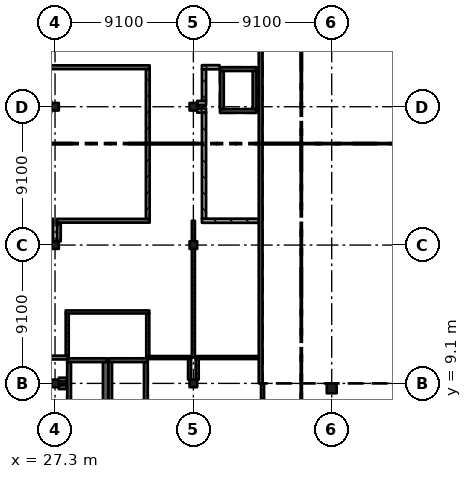
"""IFC4 building model, lengths in metres.
Left out: names, types, materials, properties, quantities, classifications, styles, units other than length and angle.
Written with IfcOpenShell. Run it as: python <this file> out.ifc"""

import sys

from ifc_helpers import new_model, si_unit, direction, frame, frame_2d, origin, origin_2d, place, context, subcontext, project, spatial, rectangle, extrude, element, fill, save


model = new_model("IFC4")
c1 = context("Model", 3, precision=1e-05, world=origin(), true_north=direction((0.0, 1.0)))
c2 = subcontext(c1, "Body", "Model", "MODEL_VIEW")
j1 = project(units=[si_unit("LENGTHUNIT", "METRE"), si_unit("PLANEANGLEUNIT", "RADIAN")], contexts=[c1])
p1 = place(None, origin())
s1 = spatial("IfcSite", under=j1, at=p1, CompositionType="ELEMENT")
p2 = place(p1, origin())
s2 = spatial("IfcBuilding", under=s1, at=p2, CompositionType="ELEMENT")
p3 = place(p2, frame((0.0, 0.0, 24.57)))
s3 = spatial("IfcBuildingStorey", under=s2, at=p3, CompositionType="ELEMENT", Elevation=24.57)
for number, where, z_axis, x_axis in (
    (1, (27.3, 9.1, 0.0), (0.0, 0.0, 1.0), (1.0, 0.0, 0.0)),
    (2, (27.3, 18.2, 0.0), (0.0, 0.0, 1.0), (1.0, 0.0, 0.0)),
    (3, (27.3, 27.3, 0.0), (0.0, 0.0, 1.0), (1.0, 0.0, 0.0)),
    (4, (36.4, 9.1, 0.0), (0.0, 0.0, 1.0), (1.0, 0.0, 0.0)),
    (5, (36.4, 18.2, 0.0), (0.0, 0.0, 1.0), (1.0, 0.0, 0.0)),
    (6, (36.4, 27.3, 0.0), (0.0, 0.0, 1.0), (1.0, 0.0, 0.0)),
):
    element("IfcColumn", number, at=place(p3, frame(where, z_axis=z_axis, x_axis=x_axis)), inside=s3, PredefinedType="COLUMN", context=c2, shape_type="SweptSolid", body=[
        extrude(rectangle(XDim=0.5, YDim=0.5, at=origin_2d()), origin(), (0.0, 0.0, 1.0), 4.55),
    ])
p4 = place(p3, frame((45.5, 8.775, 0.0), z_axis=(0.0, 0.0, 1.0), x_axis=(1.0, 0.0, 0.0)))
e7 = element("IfcColumn", 7, at=p4, inside=s3, PredefinedType="COLUMN", context=c2, shape_type="SweptSolid", body=[
    extrude(rectangle(XDim=0.65, YDim=0.65, at=origin_2d()), origin(), (0.0, 0.0, 1.0), 4.55),
])
p5 = place(p3, frame((40.825, 40.95, 0.0), z_axis=(0.0, 0.0, 1.0), x_axis=(0.0, -1.0, 0.0)))
e8 = element("IfcWall", 8, at=p5, inside=s3, PredefinedType="SHEAR", context=c2, shape_type="SweptSolid", body=[
    extrude(rectangle(XDim=31.85, YDim=0.25, at=frame_2d((15.925, 0.0))), origin(), (0.0, 0.0, 1.0), 4.55),
])
p6 = place(p3, frame((30.7, 10.625, 0.0), z_axis=(0.0, 0.0, 1.0), x_axis=(-1.0, 0.0, 0.0)))
e9 = element("IfcWall", 9, at=p6, inside=s3, PredefinedType="SHEAR", context=c2, shape_type="SweptSolid", body=[
    extrude(rectangle(XDim=2.6, YDim=0.25, at=frame_2d((1.3, 0.0))), origin(), (0.0, 0.0, 1.0), 4.55),
])
p7 = place(p6, frame((0.8, 0.0, 0.0)))
e10 = element("IfcOpeningElement", 10, at=p7, cuts=e9, PredefinedType="OPENING", context=c2, shape_type="SweptSolid", body=[
    extrude(rectangle(XDim=1.0, YDim=2.1, at=frame_2d((0.5, 1.05))), frame((0.0, 0.135, 0.0), z_axis=(0.0, -1.0, 0.0), x_axis=(1.0, 0.0, 0.0)), (0.0, 0.0, 1.0), 0.27),
])
p8 = place(p3, frame((28.225, 10.5, 0.0), z_axis=(0.0, 0.0, 1.0), x_axis=(0.0, -1.0, 0.0)))
e11 = element("IfcWall", 11, at=p8, inside=s3, PredefinedType="SHEAR", context=c2, shape_type="SweptSolid", body=[
    extrude(rectangle(XDim=2.9, YDim=0.25, at=frame_2d((1.45, 0.0))), origin(), (0.0, 0.0, 1.0), 4.55),
])
p9 = place(p3, frame((30.625, 10.5, 0.0), z_axis=(0.0, 0.0, 1.0), x_axis=(0.0, -1.0, 0.0)))
e12 = element("IfcWall", 12, at=p9, inside=s3, PredefinedType="SHEAR", context=c2, shape_type="SweptSolid", body=[
    extrude(rectangle(XDim=2.9, YDim=0.35, at=frame_2d((1.45, 0.0))), origin(), (0.0, 0.0, 1.0), 4.55),
])
p10 = place(p3, frame((33.4, 10.625, 0.0), z_axis=(0.0, 0.0, 1.0), x_axis=(-1.0, 0.0, 0.0)))
e13 = element("IfcWall", 13, at=p10, inside=s3, PredefinedType="SHEAR", context=c2, shape_type="SweptSolid", body=[
    extrude(rectangle(XDim=2.6, YDim=0.25, at=frame_2d((1.3, 0.0))), origin(), (0.0, 0.0, 1.0), 4.55),
])
p11 = place(p10, frame((0.8, 0.0, 0.0)))
e14 = element("IfcOpeningElement", 14, at=p11, cuts=e13, PredefinedType="OPENING", context=c2, shape_type="SweptSolid", body=[
    extrude(rectangle(XDim=1.0, YDim=2.1, at=frame_2d((0.5, 1.05))), frame((0.0, 0.135, 0.0), z_axis=(0.0, -1.0, 0.0), x_axis=(1.0, 0.0, 0.0)), (0.0, 0.0, 1.0), 0.27),
])
for number, where, z_axis, x_axis in (
    (15, (30.925, 10.5, 0.0), (0.0, 0.0, 1.0), (0.0, -1.0, 0.0)),
    (16, (33.275, 10.5, 0.0), (0.0, 0.0, 1.0), (0.0, -1.0, 0.0)),
):
    element("IfcWall", number, at=place(p3, frame(where, z_axis=z_axis, x_axis=x_axis)), inside=s3, PredefinedType="SHEAR", context=c2, shape_type="SweptSolid", body=[
        extrude(rectangle(XDim=2.9, YDim=0.25, at=frame_2d((1.45, 0.0))), origin(), (0.0, 0.0, 1.0), 4.55),
    ])
p12 = place(p3, frame((40.55, 27.025, 0.0), z_axis=(0.0, 0.0, 1.0), x_axis=(-1.0, 0.0, 0.0)))
e17 = element("IfcWall", 17, at=p12, inside=s3, PredefinedType="SHEAR", context=c2, shape_type="SweptSolid", body=[
    extrude(rectangle(XDim=2.4, YDim=0.25, at=frame_2d((1.2, 0.0))), origin(), (0.0, 0.0, 1.0), 4.55),
])
p13 = place(p12, frame((0.75, 0.0, 0.0)))
e18 = element("IfcOpeningElement", 18, at=p13, cuts=e17, PredefinedType="OPENING", context=c2, shape_type="SweptSolid", body=[
    extrude(rectangle(XDim=0.9, YDim=2.1, at=frame_2d((0.45, 1.05))), frame((0.0, 0.135, 0.0), z_axis=(0.0, -1.0, 0.0), x_axis=(1.0, 0.0, 0.0)), (0.0, 0.0, 1.0), 0.27),
])
p14 = place(p3, frame((40.55, 29.775, 0.0), z_axis=(0.0, 0.0, 1.0), x_axis=(-1.0, 0.0, 0.0)))
e19 = element("IfcWall", 19, at=p14, inside=s3, PredefinedType="SHEAR", context=c2, shape_type="SweptSolid", body=[
    extrude(rectangle(XDim=2.4, YDim=0.25, at=frame_2d((1.2, 0.0))), origin(), (0.0, 0.0, 1.0), 4.55),
])
for number, where, z_axis, x_axis in (
    (20, (38.275, 29.65, 0.0), (0.0, 0.0, 1.0), (0.0, -1.0, 0.0)),
    (21, (40.425, 29.65, 0.0), (0.0, 0.0, 1.0), (0.0, -1.0, 0.0)),
):
    element("IfcWall", number, at=place(p3, frame(where, z_axis=z_axis, x_axis=x_axis)), inside=s3, PredefinedType="SHEAR", context=c2, shape_type="SweptSolid", body=[
        extrude(rectangle(XDim=2.5, YDim=0.25, at=frame_2d((1.25, 0.0))), origin(), (0.0, 0.0, 1.0), 4.55),
    ])
p15 = place(p3, frame((24.3, 19.8, 0.0), z_axis=(0.0, 0.0, 1.0), x_axis=(1.0, 0.0, 0.0)))
e22 = element("IfcWall", 22, at=p15, inside=s3, PredefinedType="SOLIDWALL", context=c2, shape_type="SweptSolid", body=[
    extrude(rectangle(XDim=2.875, YDim=0.25, at=frame_2d((1.438, 0.0))), origin(), (0.0, 0.0, 1.0), 4.35),
])
p16 = place(p3, frame((26.73, 29.9, 0.0), z_axis=(0.0, 0.0, 1.0), x_axis=(1.0, 0.0, 0.0)))
e23 = element("IfcWall", 23, at=p16, inside=s3, PredefinedType="SOLIDWALL", context=c2, shape_type="SweptSolid", body=[
    extrude(rectangle(XDim=6.795, YDim=0.25, at=frame_2d((3.397, 0.0))), origin(), (0.0, 0.0, 1.0), 4.35),
])
p17 = place(p3, frame((27.05, 19.675, 0.0), z_axis=(0.0, 0.0, 1.0), x_axis=(0.0, -1.0, 0.0)))
e24 = element("IfcWall", 24, at=p17, inside=s3, PredefinedType="SOLIDWALL", context=c2, shape_type="SweptSolid", body=[
    extrude(rectangle(XDim=1.225, YDim=0.25, at=frame_2d((0.613, 0.0))), origin(), (0.0, 0.0, 1.0), 4.35),
])
p18 = place(p3, frame((27.425, 19.8, 0.0), z_axis=(0.0, 0.0, 1.0), x_axis=(1.0, 0.0, 0.0)))
e25 = element("IfcWall", 25, at=p18, inside=s3, PredefinedType="SOLIDWALL", context=c2, shape_type="SweptSolid", body=[
    extrude(rectangle(XDim=6.1, YDim=0.25, at=frame_2d((3.05, 0.0))), origin(), (0.0, 0.0, 1.0), 4.35),
])
p19 = place(p18, frame((2.65, 0.0, 0.0)))
e26 = element("IfcOpeningElement", 26, at=p19, cuts=e25, PredefinedType="OPENING", context=c2, shape_type="SweptSolid", body=[
    extrude(rectangle(XDim=0.8, YDim=2.1, at=frame_2d((0.4, 1.05))), frame((0.0, 0.135, 0.0), z_axis=(0.0, -1.0, 0.0), x_axis=(1.0, 0.0, 0.0)), (0.0, 0.0, 1.0), 0.27),
])
p20 = place(p3, frame((27.55, 8.85, 0.0), z_axis=(0.0, 0.0, 1.0), x_axis=(1.0, 0.0, 0.0)))
e27 = element("IfcWall", 27, at=p20, inside=s3, PredefinedType="SOLIDWALL", context=c2, shape_type="SweptSolid", body=[
    extrude(rectangle(XDim=0.52, YDim=0.25, at=frame_2d((0.26, 0.0))), origin(), (0.0, 0.0, 1.0), 4.35),
])
p21 = place(p3, frame((27.55, 18.45, 0.0), z_axis=(0.0, 0.0, 1.0), x_axis=(0.0, 1.0, 0.0)))
e28 = element("IfcWall", 28, at=p21, inside=s3, PredefinedType="SOLIDWALL", context=c2, shape_type="SweptSolid", body=[
    extrude(rectangle(XDim=1.225, YDim=0.25, at=frame_2d((0.613, 0.0))), origin(), (0.0, 0.0, 1.0), 4.35),
])
p22 = place(p3, frame((28.07, 9.35, 0.0), z_axis=(0.0, 0.0, 1.0), x_axis=(-1.0, 0.0, 0.0)))
e29 = element("IfcWall", 29, at=p22, inside=s3, PredefinedType="SOLIDWALL", context=c2, shape_type="SweptSolid", body=[
    extrude(rectangle(XDim=0.52, YDim=0.25, at=frame_2d((0.26, 0.0))), origin(), (0.0, 0.0, 1.0), 4.35),
])
p23 = place(p3, frame((28.1, 13.7, 0.0), z_axis=(0.0, 0.0, 1.0), x_axis=(0.0, -1.0, 0.0)))
e30 = element("IfcWall", 30, at=p23, inside=s3, PredefinedType="PARTITIONING", context=c2, shape_type="SweptSolid", body=[
    extrude(rectangle(XDim=2.775, YDim=0.2, at=frame_2d((1.387, 0.0))), origin(), (0.0, 0.0, 1.0), 4.35),
])
p24 = place(p23, frame((0.45, 0.0, 0.0)))
e31 = element("IfcOpeningElement", 31, at=p24, cuts=e30, PredefinedType="OPENING", context=c2, shape_type="SweptSolid", body=[
    extrude(rectangle(XDim=1.8, YDim=2.4, at=frame_2d((0.9, 1.2))), frame((0.0, 0.11, 0.0), z_axis=(0.0, -1.0, 0.0), x_axis=(1.0, 0.0, 0.0)), (0.0, 0.0, 1.0), 0.22),
])
p25 = place(p3, frame((28.2, 10.8, 0.0), z_axis=(0.0, 0.0, 1.0), x_axis=(-1.0, 0.0, 0.0)))
e32 = element("IfcWall", 32, at=p25, inside=s3, PredefinedType="SOLIDWALL", context=c2, shape_type="SweptSolid", body=[
    extrude(rectangle(XDim=3.87, YDim=0.25, at=frame_2d((1.935, 0.0))), origin(), (0.0, 0.0, 1.0), 4.35),
])
p26 = place(p25, frame((1.45, 0.0, 0.0)))
e33 = element("IfcOpeningElement", 33, at=p26, cuts=e32, PredefinedType="OPENING", context=c2, shape_type="SweptSolid", body=[
    extrude(rectangle(XDim=1.0, YDim=2.1, at=frame_2d((0.5, 1.05))), frame((0.0, 0.135, 0.0), z_axis=(0.0, -1.0, 0.0), x_axis=(1.0, 0.0, 0.0)), (0.0, 0.0, 1.0), 0.27),
])
p27 = place(p3, frame((33.4, 10.9, 0.0), z_axis=(0.0, 0.0, 1.0), x_axis=(0.0, 1.0, 0.0)))
e34 = element("IfcWall", 34, at=p27, inside=s3, PredefinedType="PARTITIONING", context=c2, shape_type="SweptSolid", body=[
    extrude(rectangle(XDim=2.8, YDim=0.2, at=frame_2d((1.4, 0.0))), origin(), (0.0, 0.0, 1.0), 4.35),
])
p28 = place(p27, frame((0.55, 0.0, 0.0)))
e35 = element("IfcOpeningElement", 35, at=p28, cuts=e34, PredefinedType="OPENING", context=c2, shape_type="SweptSolid", body=[
    extrude(rectangle(XDim=1.8, YDim=2.4, at=frame_2d((0.9, 1.2))), frame((0.0, 0.11, 0.0), z_axis=(0.0, -1.0, 0.0), x_axis=(1.0, 0.0, 0.0)), (0.0, 0.0, 1.0), 0.22),
])
p29 = place(p3, frame((33.4, 29.775, 0.0), z_axis=(0.0, 0.0, 1.0), x_axis=(0.0, -1.0, 0.0)))
e36 = element("IfcWall", 36, at=p29, inside=s3, PredefinedType="SOLIDWALL", context=c2, shape_type="SweptSolid", body=[
    extrude(rectangle(XDim=9.85, YDim=0.25, at=frame_2d((4.925, 0.0))), origin(), (0.0, 0.0, 1.0), 4.35),
])
p30 = place(p3, frame((33.5, 13.8, 0.0), z_axis=(0.0, 0.0, 1.0), x_axis=(-1.0, 0.0, 0.0)))
e37 = element("IfcWall", 37, at=p30, inside=s3, PredefinedType="PARTITIONING", context=c2, shape_type="SweptSolid", body=[
    extrude(rectangle(XDim=5.5, YDim=0.2, at=frame_2d((2.75, 0.0))), origin(), (0.0, 0.0, 1.0), 4.35),
])
p31 = place(p30, frame((1.85, 0.0, 0.0)))
e38 = element("IfcOpeningElement", 38, at=p31, cuts=e37, PredefinedType="OPENING", context=c2, shape_type="SweptSolid", body=[
    extrude(rectangle(XDim=1.8, YDim=2.4, at=frame_2d((0.9, 1.2))), frame((0.0, 0.11, 0.0), z_axis=(0.0, -1.0, 0.0), x_axis=(1.0, 0.0, 0.0)), (0.0, 0.0, 1.0), 0.22),
])
p32 = place(p3, frame((36.15, 9.35, 0.0), z_axis=(0.0, 0.0, 1.0), x_axis=(0.0, 1.0, 0.0)))
e39 = element("IfcWall", 39, at=p32, inside=s3, PredefinedType="PARTITIONING", context=c2, shape_type="SweptSolid", body=[
    extrude(rectangle(XDim=1.35, YDim=0.2, at=frame_2d((0.675, 0.0))), origin(), (0.0, 0.0, 1.0), 3.6),
])
p33 = place(p3, frame((36.25, 10.8, 0.0), z_axis=(0.0, 0.0, 1.0), x_axis=(-1.0, 0.0, 0.0)))
e40 = element("IfcWall", 40, at=p33, inside=s3, PredefinedType="PARTITIONING", context=c2, shape_type="SweptSolid", body=[
    extrude(rectangle(XDim=2.95, YDim=0.2, at=frame_2d((1.475, 0.0))), origin(), (0.0, 0.0, 1.0), 4.35),
])
p34 = place(p33, frame((0.55, 0.0, 0.0)))
e41 = element("IfcOpeningElement", 41, at=p34, cuts=e40, PredefinedType="OPENING", context=c2, shape_type="SweptSolid", body=[
    extrude(rectangle(XDim=1.8, YDim=2.4, at=frame_2d((0.9, 1.2))), frame((0.0, 0.11, 0.0), z_axis=(0.0, -1.0, 0.0), x_axis=(1.0, 0.0, 0.0)), (0.0, 0.0, 1.0), 0.22),
])
p35 = place(p3, frame((36.4, 17.95, 0.0), z_axis=(0.0, 0.0, 1.0), x_axis=(0.0, -1.0, 0.0)))
e42 = element("IfcWall", 42, at=p35, inside=s3, PredefinedType="PARTITIONING", context=c2, shape_type="SweptSolid", body=[
    extrude(rectangle(XDim=7.15, YDim=0.2, at=frame_2d((3.575, 0.0))), origin(), (0.0, 0.0, 1.0), 3.6),
])
p36 = place(p35, frame((0.85, 0.0, 0.0)))
e43 = element("IfcOpeningElement", 43, at=p36, cuts=e42, PredefinedType="OPENING", context=c2, shape_type="SweptSolid", body=[
    extrude(rectangle(XDim=1.8, YDim=2.4, at=frame_2d((0.9, 1.2))), frame((0.0, 0.11, 0.0), z_axis=(0.0, -1.0, 0.0), x_axis=(1.0, 0.0, 0.0)), (0.0, 0.0, 1.0), 0.22),
])
p37 = place(p35, frame((4.45, 0.0, 0.0)))
e44 = element("IfcOpeningElement", 44, at=p37, cuts=e42, PredefinedType="OPENING", context=c2, shape_type="SweptSolid", body=[
    extrude(rectangle(XDim=1.8, YDim=2.4, at=frame_2d((0.9, 1.2))), frame((0.0, 0.11, 0.0), z_axis=(0.0, -1.0, 0.0), x_axis=(1.0, 0.0, 0.0)), (0.0, 0.0, 1.0), 0.22),
])
p38 = place(p3, frame((36.4, 19.8, 0.0), z_axis=(0.0, 0.0, 1.0), x_axis=(0.0, -1.0, 0.0)))
e45 = element("IfcWall", 45, at=p38, inside=s3, PredefinedType="PARTITIONING", context=c2, shape_type="SweptSolid", body=[
    extrude(rectangle(XDim=1.35, YDim=0.2, at=frame_2d((0.675, 0.0))), origin(), (0.0, 0.0, 1.0), 3.6),
])
p39 = place(p3, frame((36.65, 10.7, 0.0), z_axis=(0.0, 0.0, 1.0), x_axis=(0.0, -1.0, 0.0)))
e46 = element("IfcWall", 46, at=p39, inside=s3, PredefinedType="PARTITIONING", context=c2, shape_type="SweptSolid", body=[
    extrude(rectangle(XDim=1.35, YDim=0.2, at=frame_2d((0.675, 0.0))), origin(), (0.0, 0.0, 1.0), 3.6),
])
p40 = place(p3, frame((36.65, 27.05, 0.0), z_axis=(0.0, 0.0, 1.0), x_axis=(1.0, 0.0, 0.0)))
e47 = element("IfcWall", 47, at=p40, inside=s3, PredefinedType="SOLIDWALL", context=c2, shape_type="SweptSolid", body=[
    extrude(rectangle(XDim=0.588, YDim=0.275, at=frame_2d((0.294, 0.0))), origin(), (0.0, 0.0, 1.0), 4.35),
])
p41 = place(p3, frame((36.962, 19.8, 0.0), z_axis=(0.0, 0.0, 1.0), x_axis=(1.0, 0.0, 0.0)))
e48 = element("IfcWall", 48, at=p41, inside=s3, PredefinedType="SOLIDWALL", context=c2, shape_type="SweptSolid", body=[
    extrude(rectangle(XDim=3.738, YDim=0.275, at=frame_2d((1.869, 0.0))), origin(), (0.0, 0.0, 1.0), 4.35),
])
p42 = place(p41, frame((1.25, 0.0, 0.0)))
e49 = element("IfcOpeningElement", 49, at=p42, cuts=e48, PredefinedType="OPENING", context=c2, shape_type="SweptSolid", body=[
    extrude(rectangle(XDim=1.2, YDim=2.4, at=frame_2d((0.6, 1.2))), frame((0.0, 0.147, 0.0), z_axis=(0.0, -1.0, 0.0), x_axis=(1.0, 0.0, 0.0)), (0.0, 0.0, 1.0), 0.295),
])
p43 = place(p3, frame((36.962, 29.9, 0.0), z_axis=(0.0, 0.0, 1.0), x_axis=(1.0, 0.0, 0.0)))
e50 = element("IfcWall", 50, at=p43, inside=s3, PredefinedType="SOLIDWALL", context=c2, shape_type="SweptSolid", body=[
    extrude(rectangle(XDim=1.158, YDim=0.275, at=frame_2d((0.579, 0.0))), origin(), (0.0, 0.0, 1.0), 4.35),
])
p44 = place(p3, frame((37.1, 26.913, 0.0), z_axis=(0.0, 0.0, 1.0), x_axis=(0.0, -1.0, 0.0)))
e51 = element("IfcWall", 51, at=p44, inside=s3, PredefinedType="SOLIDWALL", context=c2, shape_type="SweptSolid", body=[
    extrude(rectangle(XDim=6.975, YDim=0.275, at=frame_2d((3.488, 0.0))), origin(), (0.0, 0.0, 1.0), 4.35),
])
p45 = place(p3, frame((37.1, 29.762, 0.0), z_axis=(0.0, 0.0, 1.0), x_axis=(0.0, -1.0, 0.0)))
e52 = element("IfcWall", 52, at=p45, inside=s3, PredefinedType="SOLIDWALL", context=c2, shape_type="SweptSolid", body=[
    extrude(rectangle(XDim=2.075, YDim=0.275, at=frame_2d((1.038, 0.0))), origin(), (0.0, 0.0, 1.0), 4.35),
])
p46 = place(p3, frame((37.238, 27.55, 0.0), z_axis=(0.0, 0.0, 1.0), x_axis=(-1.0, 0.0, 0.0)))
e53 = element("IfcWall", 53, at=p46, inside=s3, PredefinedType="SOLIDWALL", context=c2, shape_type="SweptSolid", body=[
    extrude(rectangle(XDim=0.588, YDim=0.275, at=frame_2d((0.294, 0.0))), origin(), (0.0, 0.0, 1.0), 4.35),
])
p47 = place(p3, frame((40.7, 10.8, 0.0), z_axis=(0.0, 0.0, 1.0), x_axis=(-1.0, 0.0, 0.0)))
e54 = element("IfcWall", 54, at=p47, inside=s3, PredefinedType="PARTITIONING", context=c2, shape_type="SweptSolid", body=[
    extrude(rectangle(XDim=4.15, YDim=0.2, at=frame_2d((2.075, 0.0))), origin(), (0.0, 0.0, 1.0), 4.35),
])
p48 = place(p47, frame((1.15, 0.0, 0.0)))
e55 = element("IfcOpeningElement", 55, at=p48, cuts=e54, PredefinedType="OPENING", context=c2, shape_type="SweptSolid", body=[
    extrude(rectangle(XDim=1.8, YDim=2.4, at=frame_2d((0.9, 1.2))), frame((0.0, 0.11, 0.0), z_axis=(0.0, -1.0, 0.0), x_axis=(1.0, 0.0, 0.0)), (0.0, 0.0, 1.0), 0.22),
])
p49 = place(p3, frame((40.95, 0.1, 0.0), z_axis=(0.0, 0.0, 1.0), x_axis=(0.0, 1.0, 0.0)))
e56 = element("IfcWall", 56, at=p49, inside=s3, PredefinedType="PARTITIONING", context=c2, shape_type="SweptSolid", body=[
    extrude(rectangle(XDim=8.97, YDim=0.2, at=frame_2d((4.485, 0.0))), origin(), (0.0, 0.0, 1.0), 3.55),
])
p50 = place(p49, frame((5.02, 0.0, 0.0)))
e57 = element("IfcOpeningElement", 57, at=p50, cuts=e56, PredefinedType="OPENING", context=c2, shape_type="SweptSolid", body=[
    extrude(rectangle(XDim=2.4, YDim=2.4, at=frame_2d((1.2, 1.2))), frame((0.0, 0.11, 0.0), z_axis=(0.0, -1.0, 0.0), x_axis=(1.0, 0.0, 0.0)), (0.0, 0.0, 1.0), 0.22),
])
p51 = place(p49, frame((0.85, 0.0, 0.0)))
e58 = element("IfcOpeningElement", 58, at=p51, cuts=e56, PredefinedType="OPENING", context=c2, shape_type="SweptSolid", body=[
    extrude(rectangle(XDim=2.4, YDim=2.4, at=frame_2d((1.2, 1.2))), frame((0.0, 0.11, 0.0), z_axis=(0.0, -1.0, 0.0), x_axis=(1.0, 0.0, 0.0)), (0.0, 0.0, 1.0), 0.22),
])
p52 = place(p19, origin())
e59 = element("IfcDoor", 59, at=p52, inside=s3, OperationType="SINGLE_SWING_LEFT", PredefinedType="DOOR", context=c2, shape_type="SweptSolid", body=[
    extrude(rectangle(XDim=0.8, YDim=2.1, at=frame_2d((0.4, 1.05))), frame((0.0, 0.025, 0.0), z_axis=(0.0, -1.0, 0.0), x_axis=(1.0, 0.0, 0.0)), (0.0, 0.0, 1.0), 0.05),
])
fill(e26, e59)
p53 = place(p42, origin())
e60 = element("IfcDoor", 60, at=p53, inside=s3, OperationType="SINGLE_SWING_RIGHT", PredefinedType="DOOR", context=c2, shape_type="SweptSolid", body=[
    extrude(rectangle(XDim=1.2, YDim=2.4, at=frame_2d((0.6, 1.2))), frame((0.0, 0.025, 0.0), z_axis=(0.0, -1.0, 0.0), x_axis=(1.0, 0.0, 0.0)), (0.0, 0.0, 1.0), 0.05),
])
fill(e49, e60)
p54 = place(p36, origin())
e61 = element("IfcDoor", 61, at=p54, inside=s3, OperationType="DOUBLE_DOOR_SINGLE_SWING", PredefinedType="DOOR", context=c2, shape_type="SweptSolid", body=[
    extrude(rectangle(XDim=1.8, YDim=2.4, at=frame_2d((0.9, 1.2))), frame((0.0, 0.025, 0.0), z_axis=(0.0, -1.0, 0.0), x_axis=(1.0, 0.0, 0.0)), (0.0, 0.0, 1.0), 0.05),
])
fill(e43, e61)
p55 = place(p37, origin())
e62 = element("IfcDoor", 62, at=p55, inside=s3, OperationType="DOUBLE_DOOR_SINGLE_SWING", PredefinedType="DOOR", context=c2, shape_type="SweptSolid", body=[
    extrude(rectangle(XDim=1.8, YDim=2.4, at=frame_2d((0.9, 1.2))), frame((0.0, 0.025, 0.0), z_axis=(0.0, -1.0, 0.0), x_axis=(1.0, 0.0, 0.0)), (0.0, 0.0, 1.0), 0.05),
])
fill(e44, e62)
p56 = place(p31, origin())
e63 = element("IfcDoor", 63, at=p56, inside=s3, OperationType="DOUBLE_DOOR_SINGLE_SWING", PredefinedType="DOOR", context=c2, shape_type="SweptSolid", body=[
    extrude(rectangle(XDim=1.8, YDim=2.4, at=frame_2d((0.9, 1.2))), frame((0.0, 0.025, 0.0), z_axis=(0.0, -1.0, 0.0), x_axis=(1.0, 0.0, 0.0)), (0.0, 0.0, 1.0), 0.05),
])
fill(e38, e63)
p57 = place(p28, origin())
e64 = element("IfcDoor", 64, at=p57, inside=s3, OperationType="DOUBLE_DOOR_SINGLE_SWING", PredefinedType="DOOR", context=c2, shape_type="SweptSolid", body=[
    extrude(rectangle(XDim=1.8, YDim=2.4, at=frame_2d((0.9, 1.2))), frame((0.0, 0.025, 0.0), z_axis=(0.0, -1.0, 0.0), x_axis=(1.0, 0.0, 0.0)), (0.0, 0.0, 1.0), 0.05),
])
fill(e35, e64)
p58 = place(p24, origin())
e65 = element("IfcDoor", 65, at=p58, inside=s3, OperationType="DOUBLE_DOOR_SINGLE_SWING", PredefinedType="DOOR", context=c2, shape_type="SweptSolid", body=[
    extrude(rectangle(XDim=1.8, YDim=2.4, at=frame_2d((0.9, 1.2))), frame((0.0, 0.025, 0.0), z_axis=(0.0, -1.0, 0.0), x_axis=(1.0, 0.0, 0.0)), (0.0, 0.0, 1.0), 0.05),
])
fill(e31, e65)
p59 = place(p34, origin())
e66 = element("IfcDoor", 66, at=p59, inside=s3, OperationType="DOUBLE_DOOR_SINGLE_SWING", PredefinedType="DOOR", context=c2, shape_type="SweptSolid", body=[
    extrude(rectangle(XDim=1.8, YDim=2.4, at=frame_2d((0.9, 1.2))), frame((0.0, 0.025, 0.0), z_axis=(0.0, -1.0, 0.0), x_axis=(1.0, 0.0, 0.0)), (0.0, 0.0, 1.0), 0.05),
])
fill(e41, e66)
p60 = place(p48, origin())
e67 = element("IfcDoor", 67, at=p60, inside=s3, OperationType="DOUBLE_DOOR_SINGLE_SWING", PredefinedType="DOOR", context=c2, shape_type="SweptSolid", body=[
    extrude(rectangle(XDim=1.8, YDim=2.4, at=frame_2d((0.9, 1.2))), frame((0.0, 0.025, 0.0), z_axis=(0.0, -1.0, 0.0), x_axis=(1.0, 0.0, 0.0)), (0.0, 0.0, 1.0), 0.05),
])
fill(e55, e67)
p61 = place(p13, origin())
e68 = element("IfcDoor", 68, at=p61, inside=s3, OperationType="SINGLE_SWING_RIGHT", PredefinedType="DOOR", context=c2, shape_type="SweptSolid", body=[
    extrude(rectangle(XDim=0.9, YDim=2.1, at=frame_2d((0.45, 1.05))), frame((0.0, 0.025, 0.0), z_axis=(0.0, -1.0, 0.0), x_axis=(1.0, 0.0, 0.0)), (0.0, 0.0, 1.0), 0.05),
])
fill(e18, e68)
p62 = place(p7, origin())
e69 = element("IfcDoor", 69, at=p62, inside=s3, OperationType="DOUBLE_DOOR_SLIDING", PredefinedType="DOOR", context=c2, shape_type="SweptSolid", body=[
    extrude(rectangle(XDim=1.0, YDim=2.1, at=frame_2d((0.5, 1.05))), frame((0.0, 0.025, 0.0), z_axis=(0.0, -1.0, 0.0), x_axis=(1.0, 0.0, 0.0)), (0.0, 0.0, 1.0), 0.05),
])
fill(e10, e69)
p63 = place(p11, origin())
e70 = element("IfcDoor", 70, at=p63, inside=s3, OperationType="DOUBLE_DOOR_SLIDING", PredefinedType="DOOR", context=c2, shape_type="SweptSolid", body=[
    extrude(rectangle(XDim=1.0, YDim=2.1, at=frame_2d((0.5, 1.05))), frame((0.0, 0.025, 0.0), z_axis=(0.0, -1.0, 0.0), x_axis=(1.0, 0.0, 0.0)), (0.0, 0.0, 1.0), 0.05),
])
fill(e14, e70)
save(model, sys.argv[1])
